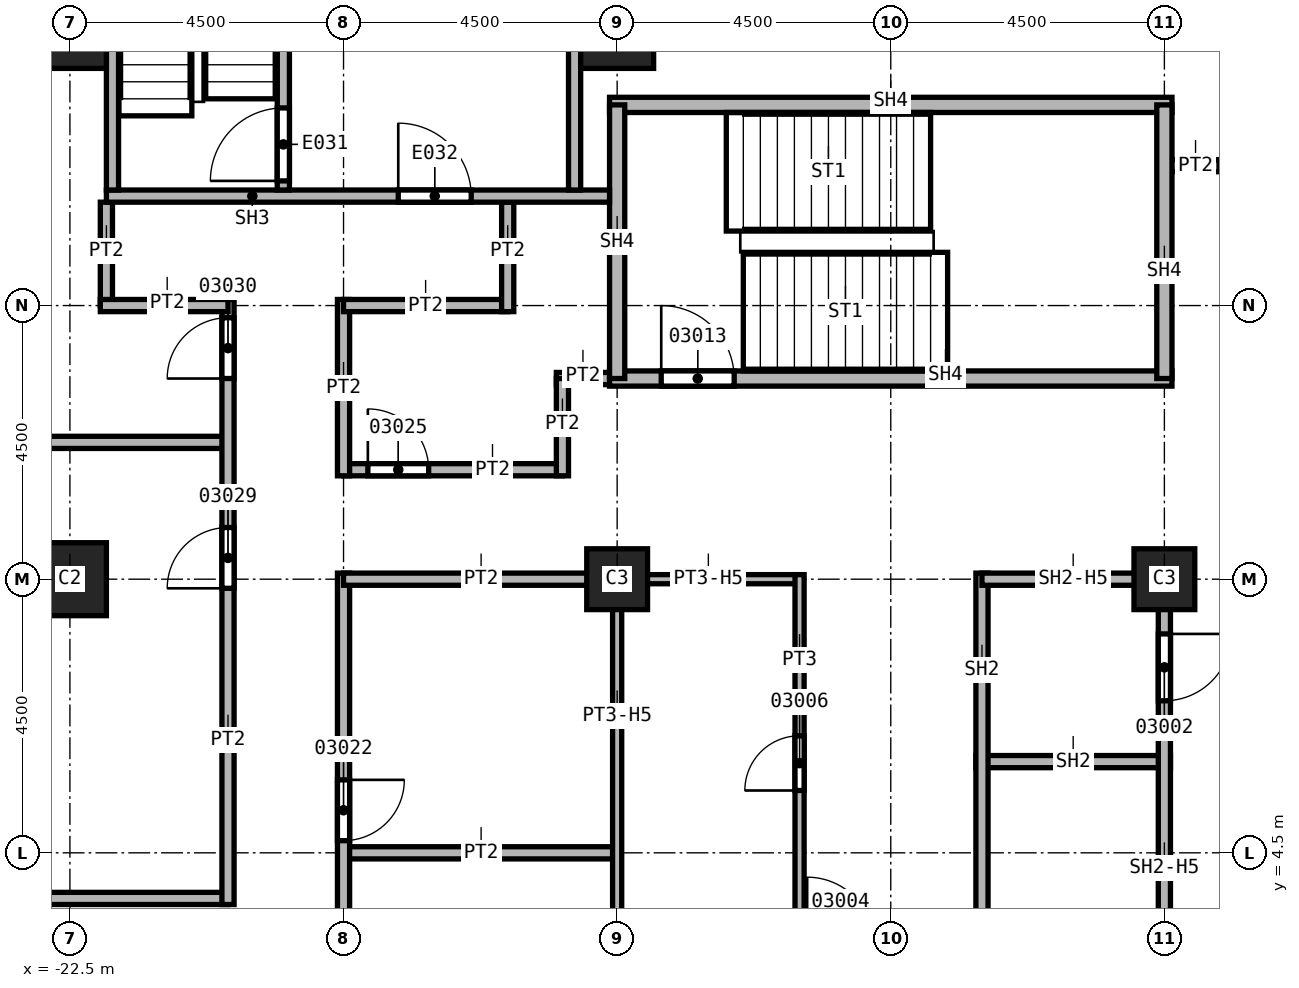
"""IFC4 building model, lengths in metres.
Left out: names, types, materials, properties, quantities, classifications, styles, units other than length and angle.
Written with IfcOpenShell. Run it as: python <this file> out.ifc"""

import sys

from ifc_helpers import new_model, si_unit, direction, frame, frame_2d, origin, origin_2d, place, context, subcontext, project, spatial, rectangle, extrude, element, fill, save


model = new_model("IFC4")
c1 = context("Model", 3, precision=1e-05, world=origin(), true_north=direction((0.0, 1.0)))
c2 = subcontext(c1, "Body", "Model", "MODEL_VIEW")
j1 = project(units=[si_unit("LENGTHUNIT", "METRE"), si_unit("PLANEANGLEUNIT", "RADIAN")], contexts=[c1])
p1 = place(None, origin())
s1 = spatial("IfcSite", under=j1, at=p1, CompositionType="ELEMENT")
p2 = place(p1, origin())
s2 = spatial("IfcBuilding", under=s1, at=p2, CompositionType="ELEMENT")
p3 = place(p2, frame((0.0, 0.0, 92.0)))
s3 = spatial("IfcBuildingStorey", under=s2, at=p3, CompositionType="ELEMENT", Elevation=92.0)
for number, where, z_axis, x_axis in (
    (1, (-13.5, 18.0, 0.0), (0.0, 0.0, 1.0), (1.0, 0.0, 0.0)),
    (2, (-22.5, 9.0, 0.0), (0.0, 0.0, 1.0), (1.0, 0.0, 0.0)),
    (3, (-22.5, 18.0, 0.0), (0.0, 0.0, 1.0), (1.0, 0.0, 0.0)),
):
    element("IfcColumn", number, at=place(p3, frame(where, z_axis=z_axis, x_axis=x_axis)), inside=s3, PredefinedType="COLUMN", context=c2, shape_type="SweptSolid", body=[
        extrude(rectangle(XDim=1.2, YDim=1.2, at=origin_2d()), origin(), (0.0, 0.0, 1.0), 3.7),
    ])
for number, where, z_axis, x_axis in (
    (4, (-4.5, 9.0, 0.0), (0.0, 0.0, 1.0), (1.0, 0.0, 0.0)),
    (5, (-13.5, 9.0, 0.0), (0.0, 0.0, 1.0), (1.0, 0.0, 0.0)),
):
    element("IfcColumn", number, at=place(p3, frame(where, z_axis=z_axis, x_axis=x_axis)), inside=s3, PredefinedType="COLUMN", context=c2, shape_type="SweptSolid", body=[
        extrude(rectangle(XDim=1.0, YDim=1.0, at=origin_2d()), origin(), (0.0, 0.0, 1.0), 3.7),
    ])
p4 = place(p3, frame((-33.85, 3.75, 0.0), z_axis=(0.0, 0.0, 1.0), x_axis=(1.0, 0.0, 0.0)))
e6 = element("IfcWall", 6, at=p4, inside=s3, PredefinedType="PARTITIONING", context=c2, shape_type="SweptSolid", body=[
    extrude(rectangle(XDim=13.95, YDim=0.2, at=frame_2d((6.975, 0.0))), origin(), (0.0, 0.0, 1.0), 3.7),
])
p5 = place(p4, frame((5.65, 0.0, 0.0)))
e7 = element("IfcOpeningElement", 7, at=p5, cuts=e6, PredefinedType="OPENING", context=c2, shape_type="SweptSolid", body=[
    extrude(rectangle(XDim=1.0, YDim=2.1, at=frame_2d((0.5, 1.05))), frame((0.0, 0.1, 0.0), z_axis=(0.0, -1.0, 0.0), x_axis=(1.0, 0.0, 0.0)), (0.0, 0.0, 1.0), 0.2),
])
p6 = place(p3, frame((-27.1, 11.25, 0.0), z_axis=(0.0, 0.0, 1.0), x_axis=(1.0, 0.0, 0.0)))
e8 = element("IfcWall", 8, at=p6, inside=s3, PredefinedType="PARTITIONING", context=c2, shape_type="SweptSolid", body=[
    extrude(rectangle(XDim=7.2, YDim=0.2, at=frame_2d((3.6, 0.0))), origin(), (0.0, 0.0, 1.0), 3.7),
])
p7 = place(p3, frame((-21.9, 13.5, 0.0), z_axis=(0.0, 0.0, 1.0), x_axis=(0.0, 1.0, 0.0)))
e9 = element("IfcWall", 9, at=p7, inside=s3, PredefinedType="PARTITIONING", context=c2, shape_type="SweptSolid", body=[
    extrude(rectangle(XDim=1.7, YDim=0.2, at=frame_2d((0.85, 0.0))), origin(), (0.0, 0.0, 1.0), 3.7),
])
p8 = place(p3, frame((-19.9, 3.65, 0.0), z_axis=(0.0, 0.0, 1.0), x_axis=(0.0, 1.0, 0.0)))
e10 = element("IfcWall", 10, at=p8, inside=s3, PredefinedType="PARTITIONING", context=c2, shape_type="SweptSolid", body=[
    extrude(rectangle(XDim=9.95, YDim=0.2, at=frame_2d((4.975, 0.0))), origin(), (0.0, 0.0, 1.0), 3.7),
])
p9 = place(p8, frame((5.2, 0.0, 0.0)))
e11 = element("IfcOpeningElement", 11, at=p9, cuts=e10, PredefinedType="OPENING", context=c2, shape_type="SweptSolid", body=[
    extrude(rectangle(XDim=1.0, YDim=2.1, at=frame_2d((0.5, 1.05))), frame((0.0, 0.1, 0.0), z_axis=(0.0, -1.0, 0.0), x_axis=(1.0, 0.0, 0.0)), (0.0, 0.0, 1.0), 0.2),
])
p10 = place(p8, frame((8.65, 0.0, 0.0)))
e12 = element("IfcOpeningElement", 12, at=p10, cuts=e10, PredefinedType="OPENING", context=c2, shape_type="SweptSolid", body=[
    extrude(rectangle(XDim=1.0, YDim=2.1, at=frame_2d((0.5, 1.05))), frame((0.0, 0.1, 0.0), z_axis=(0.0, -1.0, 0.0), x_axis=(1.0, 0.0, 0.0)), (0.0, 0.0, 1.0), 0.2),
])
p11 = place(p3, frame((-19.9, 13.5, 0.0), z_axis=(0.0, 0.0, 1.0), x_axis=(-1.0, 0.0, 0.0)))
e13 = element("IfcWall", 13, at=p11, inside=s3, PredefinedType="PARTITIONING", context=c2, shape_type="SweptSolid", body=[
    extrude(rectangle(XDim=2.1, YDim=0.2, at=frame_2d((1.05, 0.0))), origin(), (0.0, 0.0, 1.0), 3.7),
])
p12 = place(p3, frame((-18.0, 4.5, 0.0), z_axis=(0.0, 0.0, 1.0), x_axis=(1.0, 0.0, 0.0)))
e14 = element("IfcWall", 14, at=p12, inside=s3, PredefinedType="PARTITIONING", context=c2, shape_type="SweptSolid", body=[
    extrude(rectangle(XDim=4.5, YDim=0.2, at=frame_2d((2.25, 0.0))), origin(), (0.0, 0.0, 1.0), 3.7),
])
p13 = place(p3, frame((-18.0, 9.1, 0.0), z_axis=(0.0, 0.0, 1.0), x_axis=(0.0, -1.0, 0.0)))
e15 = element("IfcWall", 15, at=p13, inside=s3, PredefinedType="PARTITIONING", context=c2, shape_type="SweptSolid", body=[
    extrude(rectangle(XDim=18.2, YDim=0.2, at=frame_2d((9.1, 0.0))), origin(), (0.0, 0.0, 1.0), 3.7),
])
p14 = place(p13, frame((13.6, 0.0, 0.0)))
e16 = element("IfcOpeningElement", 16, at=p14, cuts=e15, PredefinedType="OPENING", context=c2, shape_type="SweptSolid", body=[
    extrude(rectangle(XDim=1.0, YDim=2.1, at=frame_2d((0.5, 1.05))), frame((0.0, 0.1, 0.0), z_axis=(0.0, -1.0, 0.0), x_axis=(1.0, 0.0, 0.0)), (0.0, 0.0, 1.0), 0.2),
])
p15 = place(p13, frame((3.4, 0.0, 0.0)))
e17 = element("IfcOpeningElement", 17, at=p15, cuts=e15, PredefinedType="OPENING", context=c2, shape_type="SweptSolid", body=[
    extrude(rectangle(XDim=1.0, YDim=2.1, at=frame_2d((0.5, 1.05))), frame((0.0, 0.1, 0.0), z_axis=(0.0, -1.0, 0.0), x_axis=(1.0, 0.0, 0.0)), (0.0, 0.0, 1.0), 0.2),
])
p16 = place(p3, frame((-18.0, 10.8, 0.0), z_axis=(0.0, 0.0, 1.0), x_axis=(1.0, 0.0, 0.0)))
e18 = element("IfcWall", 18, at=p16, inside=s3, PredefinedType="PARTITIONING", context=c2, shape_type="SweptSolid", body=[
    extrude(rectangle(XDim=3.6, YDim=0.2, at=frame_2d((1.8, 0.0))), origin(), (0.0, 0.0, 1.0), 3.7),
])
p17 = place(p16, frame((0.4, 0.0, 0.0)))
e19 = element("IfcOpeningElement", 19, at=p17, cuts=e18, PredefinedType="OPENING", context=c2, shape_type="SweptSolid", body=[
    extrude(rectangle(XDim=1.0, YDim=2.1, at=frame_2d((0.5, 1.05))), frame((0.0, 0.1, 0.0), z_axis=(0.0, -1.0, 0.0), x_axis=(1.0, 0.0, 0.0)), (0.0, 0.0, 1.0), 0.2),
])
p18 = place(p3, frame((-18.0, 13.6, 0.0), z_axis=(0.0, 0.0, 1.0), x_axis=(0.0, -1.0, 0.0)))
e20 = element("IfcWall", 20, at=p18, inside=s3, PredefinedType="PARTITIONING", context=c2, shape_type="SweptSolid", body=[
    extrude(rectangle(XDim=2.9, YDim=0.2, at=frame_2d((1.45, 0.0))), origin(), (0.0, 0.0, 1.0), 3.7),
])
p19 = place(p3, frame((-15.3, 13.5, 0.0), z_axis=(0.0, 0.0, 1.0), x_axis=(-1.0, 0.0, 0.0)))
e21 = element("IfcWall", 21, at=p19, inside=s3, PredefinedType="PARTITIONING", context=c2, shape_type="SweptSolid", body=[
    extrude(rectangle(XDim=2.7, YDim=0.2, at=frame_2d((1.35, 0.0))), origin(), (0.0, 0.0, 1.0), 3.7),
])
p20 = place(p3, frame((-15.3, 15.2, 0.0), z_axis=(0.0, 0.0, 1.0), x_axis=(0.0, -1.0, 0.0)))
e22 = element("IfcWall", 22, at=p20, inside=s3, PredefinedType="PARTITIONING", context=c2, shape_type="SweptSolid", body=[
    extrude(rectangle(XDim=1.8, YDim=0.2, at=frame_2d((0.9, 0.0))), origin(), (0.0, 0.0, 1.0), 3.7),
])
p21 = place(p3, frame((-14.5, 12.3, 0.0), z_axis=(0.0, 0.0, 1.0), x_axis=(1.0, 0.0, 0.0)))
e23 = element("IfcWall", 23, at=p21, inside=s3, PredefinedType="PARTITIONING", context=c2, shape_type="SweptSolid", body=[
    extrude(rectangle(XDim=1.125, YDim=0.2, at=frame_2d((0.562, 0.0))), origin(), (0.0, 0.0, 1.0), 3.7),
])
p22 = place(p3, frame((-13.5, 9.0, 0.0), z_axis=(0.0, 0.0, 1.0), x_axis=(-1.0, 0.0, 0.0)))
e24 = element("IfcWall", 24, at=p22, inside=s3, PredefinedType="PARTITIONING", context=c2, shape_type="SweptSolid", body=[
    extrude(rectangle(XDim=4.5, YDim=0.2, at=frame_2d((2.25, 0.0))), origin(), (0.0, 0.0, 1.0), 3.7),
])
p23 = place(p3, frame((-14.4, 10.7, 0.0), z_axis=(0.0, 0.0, 1.0), x_axis=(0.0, 1.0, 0.0)))
e25 = element("IfcWall", 25, at=p23, inside=s3, PredefinedType="PARTITIONING", context=c2, shape_type="SweptSolid", body=[
    extrude(rectangle(XDim=1.6, YDim=0.2, at=frame_2d((0.8, 0.0))), origin(), (0.0, 0.0, 1.0), 3.7),
])
p24 = place(p3, frame((-4.5, 15.8, 0.0), z_axis=(0.0, 0.0, 1.0), x_axis=(1.0, 0.0, 0.0)))
e26 = element("IfcWall", 26, at=p24, inside=s3, PredefinedType="PARTITIONING", context=c2, shape_type="SweptSolid", body=[
    extrude(rectangle(XDim=0.9, YDim=0.2, at=frame_2d((0.45, 0.0))), origin(), (0.0, 0.0, 1.0), 3.7),
])
p25 = place(p3, frame((-7.6, 6.0, 0.0), z_axis=(0.0, 0.0, 1.0), x_axis=(1.0, 0.0, 0.0)))
e27 = element("IfcWall", 27, at=p25, inside=s3, PredefinedType="SOLIDWALL", context=c2, shape_type="SweptSolid", body=[
    extrude(rectangle(XDim=3.2, YDim=0.2, at=frame_2d((1.6, 0.0))), origin(), (0.0, 0.0, 1.0), 3.7),
])
p26 = place(p3, frame((-7.5, 2.875, 0.0), z_axis=(0.0, 0.0, 1.0), x_axis=(0.0, 1.0, 0.0)))
e28 = element("IfcWall", 28, at=p26, inside=s3, PredefinedType="SOLIDWALL", context=c2, shape_type="SweptSolid", body=[
    extrude(rectangle(XDim=6.225, YDim=0.2, at=frame_2d((3.113, 0.0))), origin(), (0.0, 0.0, 1.0), 3.7),
])
p27 = place(p3, frame((-7.5, 9.0, 0.0), z_axis=(0.0, 0.0, 1.0), x_axis=(1.0, 0.0, 0.0)))
e29 = element("IfcWall", 29, at=p27, inside=s3, PredefinedType="SOLIDWALL", context=c2, shape_type="SweptSolid", body=[
    extrude(rectangle(XDim=3.0, YDim=0.2, at=frame_2d((1.5, 0.0))), origin(), (0.0, 0.0, 1.0), 2.938),
])
p28 = place(p3, frame((-4.5, 9.1, 0.0), z_axis=(0.0, 0.0, 1.0), x_axis=(0.0, -1.0, 0.0)))
e30 = element("IfcWall", 30, at=p28, inside=s3, PredefinedType="SOLIDWALL", context=c2, shape_type="SweptSolid", body=[
    extrude(rectangle(XDim=9.1, YDim=0.2, at=frame_2d((4.55, 0.0))), origin(), (0.0, 0.0, 1.0), 2.938),
])
p29 = place(p28, frame((6.5, 0.0, 0.0)))
e31 = element("IfcOpeningElement", 31, at=p29, cuts=e30, PredefinedType="OPENING", context=c2, shape_type="SweptSolid", body=[
    extrude(rectangle(XDim=1.1, YDim=2.1, at=frame_2d((0.55, 1.05))), frame((0.0, 0.1, 0.0), z_axis=(0.0, -1.0, 0.0), x_axis=(1.0, 0.0, 0.0)), (0.0, 0.0, 1.0), 0.2),
])
p30 = place(p28, frame((1.0, 0.0, 0.0)))
e32 = element("IfcOpeningElement", 32, at=p30, cuts=e30, PredefinedType="OPENING", context=c2, shape_type="SweptSolid", body=[
    extrude(rectangle(XDim=1.1, YDim=2.1, at=frame_2d((0.55, 1.05))), frame((0.0, 0.1, 0.0), z_axis=(0.0, -1.0, 0.0), x_axis=(1.0, 0.0, 0.0)), (0.0, 0.0, 1.0), 0.2),
])
p31 = place(p3, frame((-13.625, 12.3, 0.0), z_axis=(0.0, 0.0, 1.0), x_axis=(1.0, 0.0, 0.0)))
e33 = element("IfcWall", 33, at=p31, inside=s3, PredefinedType="SOLIDWALL", context=c2, shape_type="SweptSolid", body=[
    extrude(rectangle(XDim=9.25, YDim=0.25, at=frame_2d((4.625, 0.0))), origin(), (0.0, 0.0, 1.0), 3.7),
])
p32 = place(p31, frame((0.85, 0.0, 0.0)))
e34 = element("IfcOpeningElement", 34, at=p32, cuts=e33, PredefinedType="OPENING", context=c2, shape_type="SweptSolid", body=[
    extrude(rectangle(XDim=1.2, YDim=2.1, at=frame_2d((0.6, 1.05))), frame((0.0, 0.125, 0.0), z_axis=(0.0, -1.0, 0.0), x_axis=(1.0, 0.0, 0.0)), (0.0, 0.0, 1.0), 0.25),
])
p33 = place(p3, frame((-13.625, 16.8, 0.0), z_axis=(0.0, 0.0, 1.0), x_axis=(1.0, 0.0, 0.0)))
e35 = element("IfcWall", 35, at=p33, inside=s3, PredefinedType="SOLIDWALL", context=c2, shape_type="SweptSolid", body=[
    extrude(rectangle(XDim=9.25, YDim=0.25, at=frame_2d((4.625, 0.0))), origin(), (0.0, 0.0, 1.0), 3.7),
])
for number, where, z_axis, x_axis in (
    (36, (-13.5, 12.3, 0.0), (0.0, 0.0, 1.0), (0.0, 1.0, 0.0)),
    (37, (-4.5, 16.8, 0.0), (0.0, 0.0, 1.0), (0.0, -1.0, 0.0)),
):
    element("IfcWall", number, at=place(p3, frame(where, z_axis=z_axis, x_axis=x_axis)), inside=s3, PredefinedType="SOLIDWALL", context=c2, shape_type="SweptSolid", body=[
        extrude(rectangle(XDim=4.5, YDim=0.25, at=frame_2d((2.25, 0.0))), origin(), (0.0, 0.0, 1.0), 3.7),
    ])
p34 = place(p3, frame((-13.575, 9.0, 0.0), z_axis=(0.0, 0.0, 1.0), x_axis=(1.0, 0.0, 0.0)))
e38 = element("IfcWall", 38, at=p34, inside=s3, PredefinedType="PARTITIONING", context=c2, shape_type="SweptSolid", body=[
    extrude(rectangle(XDim=3.075, YDim=0.15, at=frame_2d((1.538, 0.0))), origin(), (0.0, 0.0, 1.0), 2.938),
])
p35 = place(p3, frame((-13.5, 3.0, 0.0), z_axis=(0.0, 0.0, 1.0), x_axis=(0.0, 1.0, 0.0)))
e39 = element("IfcWall", 39, at=p35, inside=s3, PredefinedType="PARTITIONING", context=c2, shape_type="SweptSolid", body=[
    extrude(rectangle(XDim=6.1, YDim=0.15, at=frame_2d((3.05, 0.0))), origin(), (0.0, 0.0, 1.0), 2.938),
])
p36 = place(p3, frame((-10.5, 2.875, 0.0), z_axis=(0.0, 0.0, 1.0), x_axis=(0.0, 1.0, 0.0)))
e40 = element("IfcWall", 40, at=p36, inside=s3, PredefinedType="PARTITIONING", context=c2, shape_type="SweptSolid", body=[
    extrude(rectangle(XDim=6.2, YDim=0.15, at=frame_2d((3.1, 0.0))), origin(), (0.0, 0.0, 1.0), 3.7),
])
p37 = place(p36, frame((2.65, 0.0, 0.0)))
e41 = element("IfcOpeningElement", 41, at=p37, cuts=e40, PredefinedType="OPENING", context=c2, shape_type="SweptSolid", body=[
    extrude(rectangle(XDim=0.9, YDim=2.1, at=frame_2d((0.45, 1.05))), frame((0.0, 0.075, 0.0), z_axis=(0.0, -1.0, 0.0), x_axis=(1.0, 0.0, 0.0)), (0.0, 0.0, 1.0), 0.15),
])
p38 = place(p3, frame((-21.9, 15.3, 0.0), z_axis=(0.0, 0.0, 1.0), x_axis=(1.0, 0.0, 0.0)))
e42 = element("IfcWall", 42, at=p38, inside=s3, PredefinedType="SOLIDWALL", context=c2, shape_type="SweptSolid", body=[
    extrude(rectangle(XDim=8.275, YDim=0.2, at=frame_2d((4.137, 0.0))), origin(), (0.0, 0.0, 1.0), 3.7),
])
p39 = place(p38, frame((4.8, 0.0, 0.0)))
e43 = element("IfcOpeningElement", 43, at=p39, cuts=e42, PredefinedType="OPENING", context=c2, shape_type="SweptSolid", body=[
    extrude(rectangle(XDim=1.2, YDim=2.1, at=frame_2d((0.6, 1.05))), frame((0.0, 0.1, 0.0), z_axis=(0.0, -1.0, 0.0), x_axis=(1.0, 0.0, 0.0)), (0.0, 0.0, 1.0), 0.2),
])
for number, where, z_axis, x_axis in (
    (44, (-21.8, 15.4, 0.0), (0.0, 0.0, 1.0), (0.0, 1.0, 0.0)),
    (45, (-14.2, 15.4, 0.0), (0.0, 0.0, 1.0), (0.0, 1.0, 0.0)),
):
    element("IfcWall", number, at=place(p3, frame(where, z_axis=z_axis, x_axis=x_axis)), inside=s3, PredefinedType="SOLIDWALL", context=c2, shape_type="SweptSolid", body=[
        extrude(rectangle(XDim=5.9, YDim=0.2, at=frame_2d((2.95, 0.0))), origin(), (0.0, 0.0, 1.0), 3.7),
    ])
p40 = place(p3, frame((-18.99, 15.4, 0.0), z_axis=(0.0, 0.0, 1.0), x_axis=(0.0, 1.0, 0.0)))
e46 = element("IfcWall", 46, at=p40, inside=s3, PredefinedType="SOLIDWALL", context=c2, shape_type="SweptSolid", body=[
    extrude(rectangle(XDim=5.9, YDim=0.2, at=frame_2d((2.95, 0.0))), origin(), (0.0, 0.0, 1.0), 3.7),
])
p41 = place(p40, frame((0.15, 0.0, 0.0)))
e47 = element("IfcOpeningElement", 47, at=p41, cuts=e46, PredefinedType="OPENING", context=c2, shape_type="SweptSolid", body=[
    extrude(rectangle(XDim=1.2, YDim=2.1, at=frame_2d((0.6, 1.05))), frame((0.0, 0.1, 0.0), z_axis=(0.0, -1.0, 0.0), x_axis=(1.0, 0.0, 0.0)), (0.0, 0.0, 1.0), 0.2),
])
p42 = place(p30, origin())
e48 = element("IfcDoor", 48, at=p42, inside=s3, OperationType="SINGLE_SWING_LEFT", PredefinedType="DOOR", context=c2, shape_type="SweptSolid", body=[
    extrude(rectangle(XDim=1.1, YDim=2.1, at=frame_2d((0.55, 1.05))), frame((0.0, 0.025, 0.0), z_axis=(0.0, -1.0, 0.0), x_axis=(1.0, 0.0, 0.0)), (0.0, 0.0, 1.0), 0.05),
])
fill(e32, e48)
p43 = place(p37, origin())
e49 = element("IfcDoor", 49, at=p43, inside=s3, OperationType="SINGLE_SWING_LEFT", PredefinedType="DOOR", context=c2, shape_type="SweptSolid", body=[
    extrude(rectangle(XDim=0.9, YDim=2.1, at=frame_2d((0.45, 1.05))), frame((0.0, 0.025, 0.0), z_axis=(0.0, -1.0, 0.0), x_axis=(1.0, 0.0, 0.0)), (0.0, 0.0, 1.0), 0.05),
])
fill(e41, e49)
p44 = place(p32, origin())
e50 = element("IfcDoor", 50, at=p44, inside=s3, OperationType="SINGLE_SWING_RIGHT", PredefinedType="DOOR", context=c2, shape_type="SweptSolid", body=[
    extrude(rectangle(XDim=1.2, YDim=2.1, at=frame_2d((0.6, 1.05))), frame((0.0, 0.025, 0.0), z_axis=(0.0, -1.0, 0.0), x_axis=(1.0, 0.0, 0.0)), (0.0, 0.0, 1.0), 0.05),
])
fill(e34, e50)
p45 = place(p15, origin())
e51 = element("IfcDoor", 51, at=p45, inside=s3, OperationType="SINGLE_SWING_LEFT", PredefinedType="DOOR", context=c2, shape_type="SweptSolid", body=[
    extrude(rectangle(XDim=1.0, YDim=2.1, at=frame_2d((0.5, 1.05))), frame((0.0, 0.025, 0.0), z_axis=(0.0, -1.0, 0.0), x_axis=(1.0, 0.0, 0.0)), (0.0, 0.0, 1.0), 0.05),
])
fill(e17, e51)
p46 = place(p17, origin())
e52 = element("IfcDoor", 52, at=p46, inside=s3, OperationType="SINGLE_SWING_RIGHT", PredefinedType="DOOR", context=c2, shape_type="SweptSolid", body=[
    extrude(rectangle(XDim=1.0, YDim=2.1, at=frame_2d((0.5, 1.05))), frame((0.0, 0.025, 0.0), z_axis=(0.0, -1.0, 0.0), x_axis=(1.0, 0.0, 0.0)), (0.0, 0.0, 1.0), 0.05),
])
fill(e19, e52)
p47 = place(p9, origin())
e53 = element("IfcDoor", 53, at=p47, inside=s3, OperationType="SINGLE_SWING_RIGHT", PredefinedType="DOOR", context=c2, shape_type="SweptSolid", body=[
    extrude(rectangle(XDim=1.0, YDim=2.1, at=frame_2d((0.5, 1.05))), frame((0.0, 0.025, 0.0), z_axis=(0.0, -1.0, 0.0), x_axis=(1.0, 0.0, 0.0)), (0.0, 0.0, 1.0), 0.05),
])
fill(e11, e53)
p48 = place(p10, origin())
e54 = element("IfcDoor", 54, at=p48, inside=s3, OperationType="SINGLE_SWING_LEFT", PredefinedType="DOOR", context=c2, shape_type="SweptSolid", body=[
    extrude(rectangle(XDim=1.0, YDim=2.1, at=frame_2d((0.5, 1.05))), frame((0.0, 0.025, 0.0), z_axis=(0.0, -1.0, 0.0), x_axis=(1.0, 0.0, 0.0)), (0.0, 0.0, 1.0), 0.05),
])
fill(e12, e54)
p49 = place(p41, origin())
e55 = element("IfcDoor", 55, at=p49, inside=s3, OperationType="SINGLE_SWING_LEFT", PredefinedType="DOOR", context=c2, shape_type="SweptSolid", body=[
    extrude(rectangle(XDim=1.2, YDim=2.1, at=frame_2d((0.6, 1.05))), frame((0.0, 0.025, 0.0), z_axis=(0.0, -1.0, 0.0), x_axis=(1.0, 0.0, 0.0)), (0.0, 0.0, 1.0), 0.05),
])
fill(e47, e55)
p50 = place(p39, origin())
e56 = element("IfcDoor", 56, at=p50, inside=s3, OperationType="SINGLE_SWING_RIGHT", PredefinedType="DOOR", context=c2, shape_type="SweptSolid", body=[
    extrude(rectangle(XDim=1.2, YDim=2.1, at=frame_2d((0.6, 1.05))), frame((0.0, 0.025, 0.0), z_axis=(0.0, -1.0, 0.0), x_axis=(1.0, 0.0, 0.0)), (0.0, 0.0, 1.0), 0.05),
])
fill(e43, e56)
save(model, sys.argv[1])
